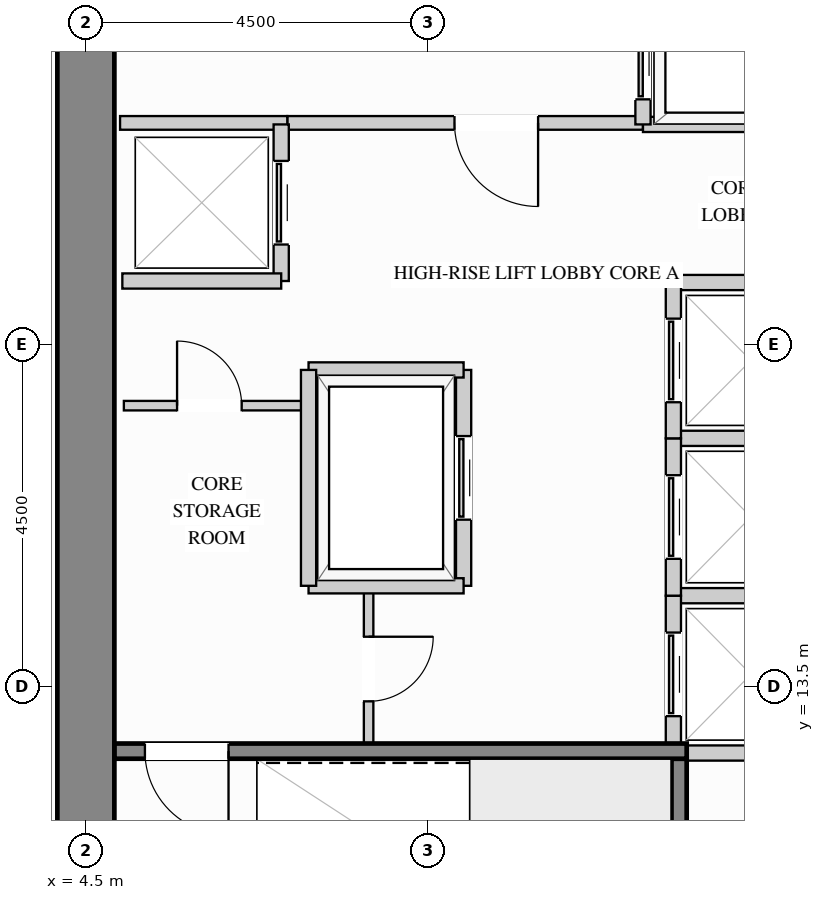
"""IFC4 building model, lengths in metres.
Left out: names, types, materials, properties, quantities, classifications, styles, units other than length and angle.
Written with IfcOpenShell. Run it as: python <this file> out.ifc"""

import sys

from ifc_helpers import new_model, si_unit, direction, frame, frame_2d, origin, place, context, subcontext, project, spatial, rectangle, extrude, source, transform, mapped, element, fill, save


model = new_model("IFC4")
c1 = context("Model", 3, precision=1e-05, world=origin(), true_north=direction((0.0, 1.0)))
c2 = subcontext(c1, "Body", "Model", "MODEL_VIEW")
j1 = project(units=[si_unit("LENGTHUNIT", "METRE"), si_unit("PLANEANGLEUNIT", "RADIAN")], contexts=[c1])
p1 = place(None, origin())
s1 = spatial("IfcSite", under=j1, at=p1, CompositionType="ELEMENT")
p2 = place(p1, origin())
s2 = spatial("IfcBuilding", under=s1, at=p2, CompositionType="ELEMENT")
p3 = place(p2, frame((0.0, 0.0, 84.6)))
s3 = spatial("IfcBuildingStorey", under=s2, at=p3, CompositionType="ELEMENT", Elevation=84.6)
m1 = source(origin(), c2, "Body", "SweptSolid", [
    extrude(rectangle(XDim=20.25, YDim=0.75, at=frame_2d((10.125, 0.0))), origin(), (0.0, 0.0, 1.0), 3.38),
])
p4 = place(p3, frame((4.5, 8.875, 0.0), z_axis=(0.0, 0.0, 1.0), x_axis=(0.0, 1.0, 0.0)))
e1 = element("IfcWall", 1, at=p4, inside=s3, PredefinedType="SHEAR", context=c2, shape_type="MappedRepresentation", body=[
    mapped(m1, transform((0.0, 0.0, 0.0), x_axis=(1.0, 0.0, 0.0), y_axis=(0.0, 1.0, 0.0), z_axis=(0.0, 0.0, 1.0))),
])
p5 = place(p3, frame((7.15, 20.92, 0.0), z_axis=(0.0, 0.0, 1.0), x_axis=(1.0, 0.0, 0.0)))
e2 = element("IfcWall", 2, at=p5, inside=s3, PredefinedType="PARTITIONING", context=c2, shape_type="SweptSolid", body=[
    extrude(rectangle(XDim=4.68, YDim=0.18, at=frame_2d((2.34, 0.0))), origin(), (0.0, 0.0, 1.0), 3.365),
])
p6 = place(p5, frame((2.2, 0.0, 0.0)))
e3 = element("IfcOpeningElement", 3, at=p6, cuts=e2, PredefinedType="OPENING", context=c2, shape_type="SweptSolid", body=[
    extrude(rectangle(XDim=1.1, YDim=2.15, at=frame_2d((0.55, 1.075))), frame((0.0, 0.1, 0.0), z_axis=(0.0, -1.0, 0.0), x_axis=(1.0, 0.0, 0.0)), (0.0, 0.0, 1.0), 0.2),
])
m2 = source(origin(), c2, "Body", "SweptSolid", [
    extrude(rectangle(XDim=2.2, YDim=0.18, at=frame_2d((1.1, 0.0))), origin(), (0.0, 0.0, 1.0), 3.365),
])
p7 = place(p3, frame((4.95, 20.92, 0.0), z_axis=(0.0, 0.0, 1.0), x_axis=(1.0, 0.0, 0.0)))
e4 = element("IfcWall", 4, at=p7, inside=s3, PredefinedType="PARTITIONING", context=c2, shape_type="MappedRepresentation", body=[
    mapped(m2, transform((0.0, 0.0, 0.0), x_axis=(1.0, 0.0, 0.0), y_axis=(0.0, 1.0, 0.0), z_axis=(0.0, 0.0, 1.0))),
])
p8 = place(p3, frame((8.22, 12.75, 0.0), z_axis=(0.0, 0.0, 1.0), x_axis=(0.0, 1.0, 0.0)))
e5 = element("IfcWall", 5, at=p8, inside=s3, PredefinedType="PARTITIONING", context=c2, shape_type="SweptSolid", body=[
    extrude(rectangle(XDim=2.07, YDim=0.125, at=frame_2d((1.035, 0.0))), origin(), (0.0, 0.0, 1.0), 3.365),
])
p9 = place(p8, frame((0.56, 0.0, 0.0)))
e6 = element("IfcOpeningElement", 6, at=p9, cuts=e5, PredefinedType="OPENING", context=c2, shape_type="SweptSolid", body=[
    extrude(rectangle(XDim=0.85, YDim=2.1, at=frame_2d((0.425, 1.05))), frame((0.0, 0.073, 0.0), z_axis=(0.0, -1.0, 0.0), x_axis=(1.0, 0.0, 0.0)), (0.0, 0.0, 1.0), 0.145),
])
p10 = place(p3, frame((5.0, 17.2, 0.0), z_axis=(0.0, 0.0, 1.0), x_axis=(1.0, 0.0, 0.0)))
e7 = element("IfcWall", 7, at=p10, inside=s3, PredefinedType="PARTITIONING", context=c2, shape_type="SweptSolid", body=[
    extrude(rectangle(XDim=2.4, YDim=0.125, at=frame_2d((1.2, 0.0))), origin(), (0.0, 0.0, 1.0), 3.365),
])
p11 = place(p10, frame((0.7, 0.0, 0.0)))
e8 = element("IfcOpeningElement", 8, at=p11, cuts=e7, PredefinedType="OPENING", context=c2, shape_type="SweptSolid", body=[
    extrude(rectangle(XDim=0.85, YDim=2.1, at=frame_2d((0.425, 1.05))), frame((0.0, 0.073, 0.0), z_axis=(0.0, -1.0, 0.0), x_axis=(1.0, 0.0, 0.0)), (0.0, 0.0, 1.0), 0.145),
])
m3 = source(origin(), c2, "Body", "SweptSolid", [
    extrude(rectangle(XDim=2.265, YDim=0.2, at=frame_2d((1.132, 0.0))), origin(), (0.0, 0.0, 1.0), 3.365),
])
p12 = place(p3, frame((11.83, 20.9, 0.0), z_axis=(0.0, 0.0, 1.0), x_axis=(1.0, 0.0, 0.0)))
e9 = element("IfcWall", 9, at=p12, inside=s3, PredefinedType="PARTITIONING", context=c2, shape_type="MappedRepresentation", body=[
    mapped(m3, transform((0.0, 0.0, 0.0), x_axis=(1.0, 0.0, 0.0), y_axis=(0.0, 1.0, 0.0), z_axis=(0.0, 0.0, 1.0))),
])
p13 = place(p3, frame((11.83, 20.9, 0.0), z_axis=(0.0, 0.0, 1.0), x_axis=(0.0, 1.0, 0.0)))
e10 = element("IfcWall", 10, at=p13, inside=s3, PredefinedType="PARTITIONING", context=c2, shape_type="SweptSolid", body=[
    extrude(rectangle(XDim=1.76, YDim=0.2, at=frame_2d((0.88, 0.0))), origin(), (0.0, 0.0, 1.0), 3.365),
])
p14 = place(p13, frame((0.33, 0.0, 0.0)))
e11 = element("IfcOpeningElement", 11, at=p14, cuts=e10, PredefinedType="OPENING", context=c2, shape_type="SweptSolid", body=[
    extrude(rectangle(XDim=1.1, YDim=2.2, at=frame_2d((0.55, 1.1))), frame((0.0, 0.11, 0.0), z_axis=(0.0, -1.0, 0.0), x_axis=(1.0, 0.0, 0.0)), (0.0, 0.0, 1.0), 0.22),
])
m4 = source(origin(), c2, "Body", "SweptSolid", [
    extrude(rectangle(XDim=1.865, YDim=0.2, at=frame_2d((0.933, 0.0))), origin(), (0.0, 0.0, 1.0), 3.365),
])
for number, where, z_axis, x_axis in (
    (12, (12.23, 14.7, 0.0), (0.0, 0.0, 1.0), (1.0, 0.0, 0.0)),
    (13, (12.23, 12.63, 0.0), (0.0, 0.0, 1.0), (1.0, 0.0, 0.0)),
):
    element("IfcWall", number, at=place(p3, frame(where, z_axis=z_axis, x_axis=x_axis)), inside=s3, PredefinedType="PARTITIONING", context=c2, shape_type="MappedRepresentation", body=[
        mapped(m4, transform((0.0, 0.0, 0.0), x_axis=(1.0, 0.0, 0.0), y_axis=(0.0, 1.0, 0.0), z_axis=(0.0, 0.0, 1.0))),
    ])
p15 = place(p3, frame((12.23, 12.63, 0.0), z_axis=(0.0, 0.0, 1.0), x_axis=(0.0, 1.0, 0.0)))
e14 = element("IfcWall", 14, at=p15, inside=s3, PredefinedType="PARTITIONING", context=c2, shape_type="SweptSolid", body=[
    extrude(rectangle(XDim=2.07, YDim=0.2, at=frame_2d((1.035, 0.0))), origin(), (0.0, 0.0, 1.0), 3.365),
])
p16 = place(p15, frame((0.485, 0.0, 0.0)))
e15 = element("IfcOpeningElement", 15, at=p16, cuts=e14, PredefinedType="OPENING", context=c2, shape_type="SweptSolid", body=[
    extrude(rectangle(XDim=1.1, YDim=2.2, at=frame_2d((0.55, 1.1))), frame((0.0, 0.11, 0.0), z_axis=(0.0, -1.0, 0.0), x_axis=(1.0, 0.0, 0.0)), (0.0, 0.0, 1.0), 0.22),
])
p17 = place(p3, frame((12.23, 16.77, 0.0), z_axis=(0.0, 0.0, 1.0), x_axis=(1.0, 0.0, 0.0)))
e16 = element("IfcWall", 16, at=p17, inside=s3, PredefinedType="PARTITIONING", context=c2, shape_type="MappedRepresentation", body=[
    mapped(m4, transform((0.0, 0.0, 0.0), x_axis=(1.0, 0.0, 0.0), y_axis=(0.0, 1.0, 0.0), z_axis=(0.0, 0.0, 1.0))),
])
p18 = place(p3, frame((12.23, 14.7, 0.0), z_axis=(0.0, 0.0, 1.0), x_axis=(0.0, 1.0, 0.0)))
e17 = element("IfcWall", 17, at=p18, inside=s3, PredefinedType="PARTITIONING", context=c2, shape_type="SweptSolid", body=[
    extrude(rectangle(XDim=2.07, YDim=0.2, at=frame_2d((1.035, 0.0))), origin(), (0.0, 0.0, 1.0), 3.365),
])
p19 = place(p18, frame((0.485, 0.0, 0.0)))
e18 = element("IfcOpeningElement", 18, at=p19, cuts=e17, PredefinedType="OPENING", context=c2, shape_type="SweptSolid", body=[
    extrude(rectangle(XDim=1.1, YDim=2.2, at=frame_2d((0.55, 1.1))), frame((0.0, 0.11, 0.0), z_axis=(0.0, -1.0, 0.0), x_axis=(1.0, 0.0, 0.0)), (0.0, 0.0, 1.0), 0.22),
])
p20 = place(p3, frame((12.23, 18.82, 0.0), z_axis=(0.0, 0.0, 1.0), x_axis=(1.0, 0.0, 0.0)))
e19 = element("IfcWall", 19, at=p20, inside=s3, PredefinedType="PARTITIONING", context=c2, shape_type="MappedRepresentation", body=[
    mapped(m4, transform((0.0, 0.0, 0.0), x_axis=(1.0, 0.0, 0.0), y_axis=(0.0, 1.0, 0.0), z_axis=(0.0, 0.0, 1.0))),
])
p21 = place(p3, frame((12.23, 16.77, 0.0), z_axis=(0.0, 0.0, 1.0), x_axis=(0.0, 1.0, 0.0)))
e20 = element("IfcWall", 20, at=p21, inside=s3, PredefinedType="PARTITIONING", context=c2, shape_type="SweptSolid", body=[
    extrude(rectangle(XDim=2.05, YDim=0.2, at=frame_2d((1.025, 0.0))), origin(), (0.0, 0.0, 1.0), 3.365),
])
p22 = place(p21, frame((0.475, 0.0, 0.0)))
e21 = element("IfcOpeningElement", 21, at=p22, cuts=e20, PredefinedType="OPENING", context=c2, shape_type="SweptSolid", body=[
    extrude(rectangle(XDim=1.1, YDim=2.2, at=frame_2d((0.55, 1.1))), frame((0.0, 0.11, 0.0), z_axis=(0.0, -1.0, 0.0), x_axis=(1.0, 0.0, 0.0)), (0.0, 0.0, 1.0), 0.22),
])
p23 = place(p3, frame((7.07, 18.84, 0.0), z_axis=(0.0, 0.0, 1.0), x_axis=(0.0, 1.0, 0.0)))
e22 = element("IfcWall", 22, at=p23, inside=s3, PredefinedType="PARTITIONING", context=c2, shape_type="SweptSolid", body=[
    extrude(rectangle(XDim=2.06, YDim=0.2, at=frame_2d((1.03, 0.0))), origin(), (0.0, 0.0, 1.0), 3.365),
])
p24 = place(p23, frame((0.48, 0.0, 0.0)))
e23 = element("IfcOpeningElement", 23, at=p24, cuts=e22, PredefinedType="OPENING", context=c2, shape_type="SweptSolid", body=[
    extrude(rectangle(XDim=1.1, YDim=2.2, at=frame_2d((0.55, 1.1))), frame((0.0, 0.11, 0.0), z_axis=(0.0, -1.0, 0.0), x_axis=(1.0, 0.0, 0.0)), (0.0, 0.0, 1.0), 0.22),
])
m5 = source(origin(), c2, "Body", "SweptSolid", [
    extrude(rectangle(XDim=2.09, YDim=0.2, at=frame_2d((1.045, 0.0))), origin(), (0.0, 0.0, 1.0), 3.365),
])
p25 = place(p3, frame((4.98, 18.84, 0.0), z_axis=(0.0, 0.0, 1.0), x_axis=(1.0, 0.0, 0.0)))
e24 = element("IfcWall", 24, at=p25, inside=s3, PredefinedType="PARTITIONING", context=c2, shape_type="MappedRepresentation", body=[
    mapped(m5, transform((0.0, 0.0, 0.0), x_axis=(1.0, 0.0, 0.0), y_axis=(0.0, 1.0, 0.0), z_axis=(0.0, 0.0, 1.0))),
])
p26 = place(p3, frame((9.47, 14.83, 0.0), z_axis=(0.0, 0.0, 1.0), x_axis=(0.0, 1.0, 0.0)))
e25 = element("IfcWall", 25, at=p26, inside=s3, PredefinedType="PARTITIONING", context=c2, shape_type="SweptSolid", body=[
    extrude(rectangle(XDim=2.84, YDim=0.2, at=frame_2d((1.42, 0.0))), origin(), (0.0, 0.0, 1.0), 3.365),
])
p27 = place(p26, frame((0.87, 0.0, 0.0)))
e26 = element("IfcOpeningElement", 26, at=p27, cuts=e25, PredefinedType="OPENING", context=c2, shape_type="SweptSolid", body=[
    extrude(rectangle(XDim=1.1, YDim=2.2, at=frame_2d((0.55, 1.1))), frame((0.0, 0.11, 0.0), z_axis=(0.0, -1.0, 0.0), x_axis=(1.0, 0.0, 0.0)), (0.0, 0.0, 1.0), 0.22),
])
m6 = source(origin(), c2, "Body", "SweptSolid", [
    extrude(rectangle(XDim=2.04, YDim=0.2, at=frame_2d((1.02, 0.0))), origin(), (0.0, 0.0, 1.0), 3.365),
])
for number, where, z_axis, x_axis in (
    (27, (7.43, 17.67, 0.0), (0.0, 0.0, 1.0), (1.0, 0.0, 0.0)),
    (28, (7.43, 14.83, 0.0), (0.0, 0.0, 1.0), (1.0, 0.0, 0.0)),
):
    element("IfcWall", number, at=place(p3, frame(where, z_axis=z_axis, x_axis=x_axis)), inside=s3, PredefinedType="PARTITIONING", context=c2, shape_type="MappedRepresentation", body=[
        mapped(m6, transform((0.0, 0.0, 0.0), x_axis=(1.0, 0.0, 0.0), y_axis=(0.0, 1.0, 0.0), z_axis=(0.0, 0.0, 1.0))),
    ])
m7 = source(origin(), c2, "Body", "SweptSolid", [
    extrude(rectangle(XDim=2.84, YDim=0.2, at=frame_2d((1.42, 0.0))), origin(), (0.0, 0.0, 1.0), 3.365),
])
p28 = place(p3, frame((7.43, 14.83, 0.0), z_axis=(0.0, 0.0, 1.0), x_axis=(0.0, 1.0, 0.0)))
e29 = element("IfcWall", 29, at=p28, inside=s3, PredefinedType="PARTITIONING", context=c2, shape_type="MappedRepresentation", body=[
    mapped(m7, transform((0.0, 0.0, 0.0), x_axis=(1.0, 0.0, 0.0), y_axis=(0.0, 1.0, 0.0), z_axis=(0.0, 0.0, 1.0))),
])
m8 = source(origin(), c2, "Body", "SweptSolid", [
    extrude(rectangle(XDim=3.678, YDim=0.2, at=frame_2d((1.839, 0.0))), origin(), (0.0, 0.0, 1.0), 3.38),
])
p29 = place(p3, frame((12.305, 8.877, 0.0), z_axis=(0.0, 0.0, 1.0), x_axis=(0.0, 1.0, 0.0)))
e30 = element("IfcWall", 30, at=p29, inside=s3, PredefinedType="SHEAR", context=c2, shape_type="MappedRepresentation", body=[
    mapped(m8, transform((0.0, 0.0, 0.0), x_axis=(1.0, 0.0, 0.0), y_axis=(0.0, 1.0, 0.0), z_axis=(0.0, 0.0, 1.0))),
])
p30 = place(p3, frame((4.877, 12.655, 0.0), z_axis=(0.0, 0.0, 1.0), x_axis=(1.0, 0.0, 0.0)))
e31 = element("IfcWall", 31, at=p30, inside=s3, PredefinedType="SHEAR", context=c2, shape_type="SweptSolid", body=[
    extrude(rectangle(XDim=7.528, YDim=0.2, at=frame_2d((3.764, 0.0))), origin(), (0.0, 0.0, 1.0), 3.38),
])
p31 = place(p30, frame((0.4, 0.0, 0.0)))
e32 = element("IfcOpeningElement", 32, at=p31, cuts=e31, PredefinedType="OPENING", context=c2, shape_type="SweptSolid", body=[
    extrude(rectangle(XDim=1.1, YDim=2.15, at=frame_2d((0.55, 1.075))), frame((0.0, 0.11, 0.0), z_axis=(0.0, -1.0, 0.0), x_axis=(1.0, 0.0, 0.0)), (0.0, 0.0, 1.0), 0.22),
])
m9 = source(origin(), c2, "Body", "SweptSolid", [
    extrude(rectangle(XDim=1.1, YDim=2.15, at=frame_2d((0.55, 1.075))), frame((0.0, 0.025, 0.0), z_axis=(0.0, -1.0, 0.0), x_axis=(1.0, 0.0, 0.0)), (0.0, 0.0, 1.0), 0.05),
])
p32 = place(p6, origin())
e33 = element("IfcDoor", 33, at=p32, inside=s3, OperationType="SINGLE_SWING_RIGHT", PredefinedType="DOOR", context=c2, shape_type="MappedRepresentation", body=[
    mapped(m9, transform((0.0, 0.0, 0.0), x_axis=(1.0, 0.0, 0.0), y_axis=(0.0, 1.0, 0.0), z_axis=(0.0, 0.0, 1.0))),
])
fill(e3, e33)
m10 = source(origin(), c2, "Body", "SweptSolid", [
    extrude(rectangle(XDim=1.1, YDim=2.2, at=frame_2d((0.55, 1.1))), frame((0.0, 0.025, 0.0), z_axis=(0.0, -1.0, 0.0), x_axis=(1.0, 0.0, 0.0)), (0.0, 0.0, 1.0), 0.05),
])
p33 = place(p14, origin())
e34 = element("IfcDoor", 34, at=p33, inside=s3, OperationType="SLIDING_TO_LEFT", PredefinedType="DOOR", context=c2, shape_type="MappedRepresentation", body=[
    mapped(m10, transform((0.0, 0.0, 0.0), x_axis=(1.0, 0.0, 0.0), y_axis=(0.0, 1.0, 0.0), z_axis=(0.0, 0.0, 1.0))),
])
fill(e11, e34)
p34 = place(p16, origin())
e35 = element("IfcDoor", 35, at=p34, inside=s3, OperationType="SLIDING_TO_LEFT", PredefinedType="DOOR", context=c2, shape_type="MappedRepresentation", body=[
    mapped(m10, transform((0.0, 0.0, 0.0), x_axis=(1.0, 0.0, 0.0), y_axis=(0.0, 1.0, 0.0), z_axis=(0.0, 0.0, 1.0))),
])
fill(e15, e35)
p35 = place(p19, origin())
e36 = element("IfcDoor", 36, at=p35, inside=s3, OperationType="SLIDING_TO_LEFT", PredefinedType="DOOR", context=c2, shape_type="MappedRepresentation", body=[
    mapped(m10, transform((0.0, 0.0, 0.0), x_axis=(1.0, 0.0, 0.0), y_axis=(0.0, 1.0, 0.0), z_axis=(0.0, 0.0, 1.0))),
])
fill(e18, e36)
p36 = place(p22, origin())
e37 = element("IfcDoor", 37, at=p36, inside=s3, OperationType="SLIDING_TO_LEFT", PredefinedType="DOOR", context=c2, shape_type="MappedRepresentation", body=[
    mapped(m10, transform((0.0, 0.0, 0.0), x_axis=(1.0, 0.0, 0.0), y_axis=(0.0, 1.0, 0.0), z_axis=(0.0, 0.0, 1.0))),
])
fill(e21, e37)
p37 = place(p24, origin())
e38 = element("IfcDoor", 38, at=p37, inside=s3, OperationType="SLIDING_TO_LEFT", PredefinedType="DOOR", context=c2, shape_type="MappedRepresentation", body=[
    mapped(m10, transform((0.0, 0.0, 0.0), x_axis=(1.0, 0.0, 0.0), y_axis=(0.0, 1.0, 0.0), z_axis=(0.0, 0.0, 1.0))),
])
fill(e23, e38)
p38 = place(p27, origin())
e39 = element("IfcDoor", 39, at=p38, inside=s3, OperationType="SLIDING_TO_LEFT", PredefinedType="DOOR", context=c2, shape_type="MappedRepresentation", body=[
    mapped(m10, transform((0.0, 0.0, 0.0), x_axis=(1.0, 0.0, 0.0), y_axis=(0.0, 1.0, 0.0), z_axis=(0.0, 0.0, 1.0))),
])
fill(e26, e39)
m11 = source(origin(), c2, "Body", "SweptSolid", [
    extrude(rectangle(XDim=0.85, YDim=2.1, at=frame_2d((0.425, 1.05))), frame((0.0, 0.025, 0.0), z_axis=(0.0, -1.0, 0.0), x_axis=(1.0, 0.0, 0.0)), (0.0, 0.0, 1.0), 0.05),
])
p39 = place(p11, origin())
e40 = element("IfcDoor", 40, at=p39, inside=s3, OperationType="SINGLE_SWING_LEFT", PredefinedType="DOOR", context=c2, shape_type="MappedRepresentation", body=[
    mapped(m11, transform((0.0, 0.0, 0.0), x_axis=(1.0, 0.0, 0.0), y_axis=(0.0, 1.0, 0.0), z_axis=(0.0, 0.0, 1.0))),
])
fill(e8, e40)
p40 = place(p9, origin())
e41 = element("IfcDoor", 41, at=p40, inside=s3, OperationType="SINGLE_SWING_RIGHT", PredefinedType="DOOR", context=c2, shape_type="MappedRepresentation", body=[
    mapped(m11, transform((0.0, 0.0, 0.0), x_axis=(1.0, 0.0, 0.0), y_axis=(0.0, 1.0, 0.0), z_axis=(0.0, 0.0, 1.0))),
])
fill(e6, e41)
m12 = source(origin(), c2, "Body", "SweptSolid", [
    extrude(rectangle(XDim=1.1, YDim=2.15, at=frame_2d((0.55, 1.075))), frame((0.0, 0.025, 0.0), z_axis=(0.0, -1.0, 0.0), x_axis=(1.0, 0.0, 0.0)), (0.0, 0.0, 1.0), 0.05),
])
p41 = place(p31, origin())
e42 = element("IfcDoor", 42, at=p41, inside=s3, OperationType="SINGLE_SWING_RIGHT", PredefinedType="DOOR", context=c2, shape_type="MappedRepresentation", body=[
    mapped(m12, transform((0.0, 0.0, 0.0), x_axis=(1.0, 0.0, 0.0), y_axis=(0.0, 1.0, 0.0), z_axis=(0.0, 0.0, 1.0))),
])
fill(e32, e42)
save(model, sys.argv[1])
